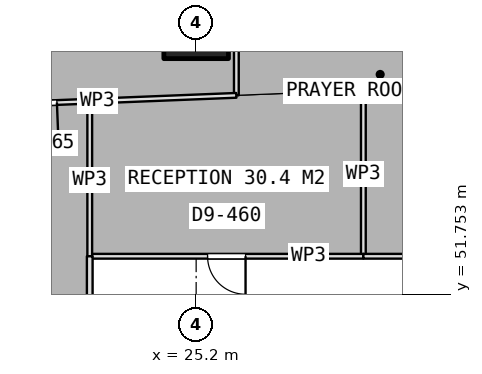
"""IFC4 building model, lengths in metres.
Left out: names, types, materials, properties, quantities, classifications, styles, units other than length and angle.
Written with IfcOpenShell. Run it as: python <this file> out.ifc"""

import sys

from ifc_helpers import new_model, si_unit, direction, frame, frame_2d, origin, origin_2d, place, context, subcontext, project, spatial, rectangle, extrude, element, fill, save


model = new_model("IFC4")
c1 = context("Model", 3, precision=1e-05, world=origin(), true_north=direction((0.0, 1.0)))
c2 = subcontext(c1, "Body", "Model", "MODEL_VIEW")
j1 = project(units=[si_unit("LENGTHUNIT", "METRE"), si_unit("PLANEANGLEUNIT", "RADIAN")], contexts=[c1])
p1 = place(None, origin())
s1 = spatial("IfcSite", under=j1, at=p1, CompositionType="ELEMENT")
p2 = place(p1, origin())
s2 = spatial("IfcBuilding", under=s1, at=p2, CompositionType="ELEMENT")
p3 = place(p2, frame((0.0, 0.0, 121.55)))
s3 = spatial("IfcBuildingStorey", under=s2, at=p3, CompositionType="ELEMENT", Elevation=121.55)
p4 = place(p3, frame((25.2, 58.8, 0.0), z_axis=(0.0, 0.0, 1.0), x_axis=(1.0, 0.0, 0.0)))
e1 = element("IfcColumn", 1, at=p4, inside=s3, PredefinedType="COLUMN", context=c2, shape_type="SweptSolid", body=[
    extrude(rectangle(XDim=1.7, YDim=1.7, at=origin_2d()), origin(), (0.0, 0.0, 1.0), 3.75),
])
p5 = place(p3, frame((26.258, 56.984, 0.0), z_axis=(0.0, 0.0, 1.0), x_axis=(0.0, 1.0, 0.0)))
e2 = element("IfcWall", 2, at=p5, inside=s3, PredefinedType="PARTITIONING", context=c2, shape_type="SweptSolid", body=[
    extrude(rectangle(XDim=4.153, YDim=0.125, at=frame_2d((2.077, 0.0))), origin(), (0.0, 0.0, 1.0), 3.5),
])
p6 = place(p3, frame((26.257, 56.984, 0.0), z_axis=(0.0, 0.0, 1.0), x_axis=(-0.999199876108, -0.039995094524, 0.0)))
e3 = element("IfcWall", 3, at=p6, inside=s3, PredefinedType="PARTITIONING", context=c2, shape_type="SweptSolid", body=[
    extrude(rectangle(XDim=10.45, YDim=0.125, at=frame_2d((5.225, 0.0))), origin(), (0.0, 0.0, 1.0), 3.5),
])
p7 = place(p6, frame((4.725, 0.0, 0.0)))
e4 = element("IfcOpeningElement", 4, at=p7, cuts=e3, PredefinedType="OPENING", context=c2, shape_type="SweptSolid", body=[
    extrude(rectangle(XDim=1.0, YDim=2.1, at=frame_2d((0.5, 1.05))), frame((0.0, 0.073, 0.0), z_axis=(0.0, -1.0, 0.0), x_axis=(1.0, 0.0, 0.0)), (0.0, 0.0, 1.0), 0.145),
])
p8 = place(p3, frame((29.6, 57.055, 0.0), z_axis=(0.0, 0.0, 1.0), x_axis=(0.0, -1.0, 0.0)))
e5 = element("IfcWall", 5, at=p8, inside=s3, PredefinedType="PARTITIONING", context=c2, shape_type="SweptSolid", body=[
    extrude(rectangle(XDim=4.305, YDim=0.125, at=frame_2d((2.152, 0.0))), origin(), (0.0, 0.0, 1.0), 3.5),
])
p9 = place(p3, frame((29.6, 52.75, 0.0), z_axis=(0.0, 0.0, 1.0), x_axis=(-1.0, 0.0, 0.0)))
e6 = element("IfcWall", 6, at=p9, inside=s3, PredefinedType="PARTITIONING", context=c2, shape_type="SweptSolid", body=[
    extrude(rectangle(XDim=7.2, YDim=0.125, at=frame_2d((3.6, 0.0))), origin(), (0.0, 0.0, 1.0), 3.5),
])
p10 = place(p9, frame((3.1, 0.0, 0.0)))
e7 = element("IfcOpeningElement", 7, at=p10, cuts=e6, PredefinedType="OPENING", context=c2, shape_type="SweptSolid", body=[
    extrude(rectangle(XDim=1.0, YDim=2.1, at=frame_2d((0.5, 1.05))), frame((0.0, 0.073, 0.0), z_axis=(0.0, -1.0, 0.0), x_axis=(1.0, 0.0, 0.0)), (0.0, 0.0, 1.0), 0.145),
])
p11 = place(p3, frame((22.4, 52.75, 0.0), z_axis=(0.0, 0.0, 1.0), x_axis=(0.0, 1.0, 0.0)))
e8 = element("IfcWall", 8, at=p11, inside=s3, PredefinedType="PARTITIONING", context=c2, shape_type="SweptSolid", body=[
    extrude(rectangle(XDim=4.017, YDim=0.125, at=frame_2d((2.009, 0.0))), origin(), (0.0, 0.0, 1.0), 3.5),
])
p12 = place(p3, frame((33.826, 52.75, 0.0), z_axis=(0.0, 0.0, 1.0), x_axis=(-1.0, 0.0, 0.0)))
e9 = element("IfcWall", 9, at=p12, inside=s3, PredefinedType="PARTITIONING", context=c2, shape_type="SweptSolid", body=[
    extrude(rectangle(XDim=4.226, YDim=0.125, at=frame_2d((2.113, 0.0))), origin(), (0.0, 0.0, 1.0), 3.5),
])
p13 = place(p3, frame((22.4, 52.75, 0.0), z_axis=(0.0, 0.0, 1.0), x_axis=(0.0, -1.0, 0.0)))
e10 = element("IfcWall", 10, at=p13, inside=s3, PredefinedType="PARTITIONING", context=c2, shape_type="SweptSolid", body=[
    extrude(rectangle(XDim=9.877, YDim=0.15, at=frame_2d((4.938, 0.0))), origin(), (0.0, 0.0, 1.0), 3.5),
])
p14 = place(p13, frame((4.439, 0.0, 0.0)))
e11 = element("IfcOpeningElement", 11, at=p14, cuts=e10, PredefinedType="OPENING", context=c2, shape_type="SweptSolid", body=[
    extrude(rectangle(XDim=1.0, YDim=2.1, at=frame_2d((0.5, 1.05))), frame((0.0, 0.085, 0.0), z_axis=(0.0, -1.0, 0.0), x_axis=(1.0, 0.0, 0.0)), (0.0, 0.0, 1.0), 0.17),
])
p15 = place(p7, origin())
e12 = element("IfcDoor", 12, at=p15, inside=s3, OperationType="SINGLE_SWING_LEFT", PredefinedType="DOOR", context=c2, shape_type="SweptSolid", body=[
    extrude(rectangle(XDim=1.0, YDim=2.1, at=frame_2d((0.5, 1.05))), frame((0.0, 0.025, 0.0), z_axis=(0.0, -1.0, 0.0), x_axis=(1.0, 0.0, 0.0)), (0.0, 0.0, 1.0), 0.05),
])
fill(e4, e12)
p16 = place(p10, origin())
e13 = element("IfcDoor", 13, at=p16, inside=s3, OperationType="SINGLE_SWING_LEFT", PredefinedType="DOOR", context=c2, shape_type="SweptSolid", body=[
    extrude(rectangle(XDim=1.0, YDim=2.1, at=frame_2d((0.5, 1.05))), frame((0.0, 0.025, 0.0), z_axis=(0.0, -1.0, 0.0), x_axis=(1.0, 0.0, 0.0)), (0.0, 0.0, 1.0), 0.05),
])
fill(e7, e13)
save(model, sys.argv[1])
